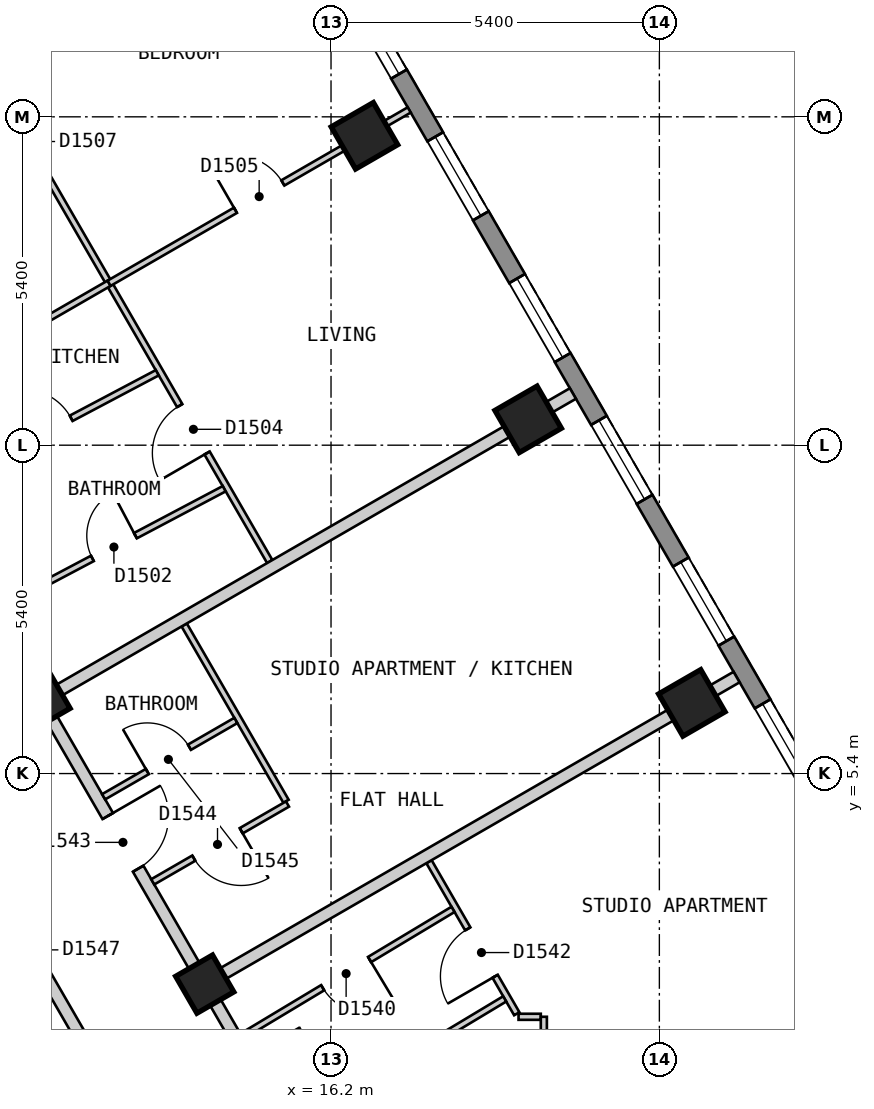
"""IFC4 building model, lengths in metres.
Left out: names, types, materials, properties, quantities, classifications, styles, units other than length and angle.
Written with IfcOpenShell. Run it as: python <this file> out.ifc"""

import sys

from ifc_helpers import new_model, si_unit, direction, frame, frame_2d, origin, origin_2d, place, context, subcontext, project, spatial, polyline, rectangle, outline, extrude, element, fill, save


model = new_model("IFC4")
c1 = context("Model", 3, precision=1e-05, world=origin(), true_north=direction((0.0, 1.0)))
c2 = subcontext(c1, "Body", "Model", "MODEL_VIEW")
j1 = project(units=[si_unit("LENGTHUNIT", "METRE"), si_unit("PLANEANGLEUNIT", "RADIAN")], contexts=[c1])
p1 = place(None, origin())
s1 = spatial("IfcSite", under=j1, at=p1, CompositionType="ELEMENT")
p2 = place(p1, origin())
s2 = spatial("IfcBuilding", under=s1, at=p2, CompositionType="ELEMENT")
p3 = place(p2, frame((0.0, 0.0, 184.2)))
s3 = spatial("IfcBuildingStorey", under=s2, at=p3, CompositionType="ELEMENT", Elevation=184.2)
for number, where, z_axis, x_axis in (
    (1, (22.134, 6.562, 0.0), (0.0, 0.0, 1.0), (-0.5, 0.866, 0.0)),
    (2, (19.442, 11.225, 0.0), (0.0, 0.0, 1.0), (-0.5, 0.866, 0.0)),
    (3, (16.75, 15.888, 0.0), (0.0, 0.0, 1.0), (-0.5, 0.866, 0.0)),
):
    element("IfcColumn", number, at=place(p3, frame(where, z_axis=z_axis, x_axis=x_axis)), inside=s3, PredefinedType="COLUMN", context=c2, shape_type="SweptSolid", body=[
        extrude(rectangle(XDim=0.8, YDim=0.8, at=origin_2d()), origin(), (0.0, 0.0, 1.0), 3.0),
    ])
for number, where, z_axis, x_axis in (
    (4, (14.123, 1.937, 0.0), (0.0, 0.0, 1.0), (-0.5, 0.866, 0.0)),
    (5, (11.431, 6.6, 0.0), (0.0, 0.0, 1.0), (-0.5, 0.866, 0.0)),
):
    element("IfcColumn", number, at=place(p3, frame(where, z_axis=z_axis, x_axis=x_axis)), inside=s3, PredefinedType="COLUMN", context=c2, shape_type="SweptSolid", body=[
        extrude(rectangle(XDim=0.7, YDim=0.7, at=origin_2d()), origin(), (0.0, 0.0, 1.0), 3.0),
    ])
p4 = place(p3, frame((26.024, 1.825, 0.0), z_axis=(0.0, 0.0, 1.0), x_axis=(-0.500010537973, 0.866019319597, 0.0)))
e6 = element("IfcWall", 6, at=p4, inside=s3, PredefinedType="SOLIDWALL", context=c2, shape_type="SweptSolid", body=[
    extrude(outline(polyline([(0.0, -0.15), (22.863, -0.15), (22.783, 0.15), (0.08, 0.15), (0.0, -0.15)])), origin(), (0.0, 0.0, 1.0), 2.7),
])
p5 = place(p4, frame((1.259, 0.0, 0.15)))
e7 = element("IfcOpeningElement", 7, at=p5, cuts=e6, PredefinedType="OPENING", context=c2, shape_type="SweptSolid", body=[
    extrude(rectangle(XDim=1.5, YDim=2.1, at=frame_2d((0.75, 1.05))), frame((0.0, 0.16, 0.0), z_axis=(0.0, -1.0, 0.0), x_axis=(1.0, 0.0, 0.0)), (0.0, 0.0, 1.0), 0.32),
])
p6 = place(p4, frame((3.952, 0.0, 0.15)))
e8 = element("IfcOpeningElement", 8, at=p6, cuts=e6, PredefinedType="OPENING", context=c2, shape_type="SweptSolid", body=[
    extrude(rectangle(XDim=1.5, YDim=2.1, at=frame_2d((0.75, 1.05))), frame((0.0, 0.16, 0.0), z_axis=(0.0, -1.0, 0.0), x_axis=(1.0, 0.0, 0.0)), (0.0, 0.0, 1.0), 0.32),
])
p7 = place(p4, frame((6.644, 0.0, 0.15)))
e9 = element("IfcOpeningElement", 9, at=p7, cuts=e6, PredefinedType="OPENING", context=c2, shape_type="SweptSolid", body=[
    extrude(rectangle(XDim=1.5, YDim=2.1, at=frame_2d((0.75, 1.05))), frame((0.0, 0.16, 0.0), z_axis=(0.0, -1.0, 0.0), x_axis=(1.0, 0.0, 0.0)), (0.0, 0.0, 1.0), 0.32),
])
p8 = place(p4, frame((9.335, 0.0, 0.15)))
e10 = element("IfcOpeningElement", 10, at=p8, cuts=e6, PredefinedType="OPENING", context=c2, shape_type="SweptSolid", body=[
    extrude(rectangle(XDim=1.5, YDim=2.1, at=frame_2d((0.75, 1.05))), frame((0.0, 0.16, 0.0), z_axis=(0.0, -1.0, 0.0), x_axis=(1.0, 0.0, 0.0)), (0.0, 0.0, 1.0), 0.32),
])
p9 = place(p4, frame((12.028, 0.0, 0.15)))
e11 = element("IfcOpeningElement", 11, at=p9, cuts=e6, PredefinedType="OPENING", context=c2, shape_type="SweptSolid", body=[
    extrude(rectangle(XDim=1.5, YDim=2.1, at=frame_2d((0.75, 1.05))), frame((0.0, 0.16, 0.0), z_axis=(0.0, -1.0, 0.0), x_axis=(1.0, 0.0, 0.0)), (0.0, 0.0, 1.0), 0.32),
])
p10 = place(p4, frame((14.72, 0.0, 0.15)))
e12 = element("IfcOpeningElement", 12, at=p10, cuts=e6, PredefinedType="OPENING", context=c2, shape_type="SweptSolid", body=[
    extrude(rectangle(XDim=1.5, YDim=2.1, at=frame_2d((0.75, 1.05))), frame((0.0, 0.16, 0.0), z_axis=(0.0, -1.0, 0.0), x_axis=(1.0, 0.0, 0.0)), (0.0, 0.0, 1.0), 0.32),
])
p11 = place(p4, frame((17.411, 0.0, 0.15)))
e13 = element("IfcOpeningElement", 13, at=p11, cuts=e6, PredefinedType="OPENING", context=c2, shape_type="SweptSolid", body=[
    extrude(rectangle(XDim=1.5, YDim=2.1, at=frame_2d((0.75, 1.05))), frame((0.0, 0.16, 0.0), z_axis=(0.0, -1.0, 0.0), x_axis=(1.0, 0.0, 0.0)), (0.0, 0.0, 1.0), 0.32),
])
p12 = place(p4, frame((20.104, 0.0, 0.15)))
e14 = element("IfcOpeningElement", 14, at=p12, cuts=e6, PredefinedType="OPENING", context=c2, shape_type="SweptSolid", body=[
    extrude(rectangle(XDim=1.5, YDim=2.1, at=frame_2d((0.75, 1.05))), frame((0.0, 0.16, 0.0), z_axis=(0.0, -1.0, 0.0), x_axis=(1.0, 0.0, 0.0)), (0.0, 0.0, 1.0), 0.32),
])
p13 = place(p3, frame((9.469, 5.6, 0.0), z_axis=(0.0, 0.0, 1.0), x_axis=(0.499964524401, -0.866045884662, 0.0)))
e15 = element("IfcWall", 15, at=p13, inside=s3, PredefinedType="PARTITIONING", context=c2, shape_type="SweptSolid", body=[
    extrude(rectangle(XDim=7.042, YDim=0.2, at=frame_2d((3.521, 0.0))), origin(), (0.0, 0.0, 1.0), 2.7),
])
p14 = place(p13, frame((3.129, 0.0, 0.0)))
e16 = element("IfcOpeningElement", 16, at=p14, cuts=e15, PredefinedType="OPENING", context=c2, shape_type="SweptSolid", body=[
    extrude(rectangle(XDim=0.9, YDim=2.1, at=frame_2d((0.45, 1.05))), frame((0.0, 0.11, 0.0), z_axis=(0.0, -1.0, 0.0), x_axis=(1.0, 0.0, 0.0)), (0.0, 0.0, 1.0), 0.22),
])
p15 = place(p3, frame((10.739, 7.8, 0.0), z_axis=(0.0, 0.0, 1.0), x_axis=(0.500023726918, -0.866011704609, 0.0)))
e17 = element("IfcWall", 17, at=p15, inside=s3, PredefinedType="PARTITIONING", context=c2, shape_type="SweptSolid", body=[
    extrude(rectangle(XDim=9.47, YDim=0.2, at=frame_2d((4.735, 0.0))), origin(), (0.0, 0.0, 1.0), 2.7),
])
p16 = place(p15, frame((8.168, 0.0, 0.0)))
e18 = element("IfcOpeningElement", 18, at=p16, cuts=e17, PredefinedType="OPENING", context=c2, shape_type="SweptSolid", body=[
    extrude(rectangle(XDim=1.0, YDim=2.1, at=frame_2d((0.5, 1.05))), frame((0.0, 0.11, 0.0), z_axis=(0.0, -1.0, 0.0), x_axis=(1.0, 0.0, 0.0)), (0.0, 0.0, 1.0), 0.22),
])
p17 = place(p15, frame((3.578, 0.0, 0.0)))
e19 = element("IfcOpeningElement", 19, at=p17, cuts=e17, PredefinedType="OPENING", context=c2, shape_type="SweptSolid", body=[
    extrude(rectangle(XDim=1.0, YDim=2.1, at=frame_2d((0.5, 1.05))), frame((0.0, 0.11, 0.0), z_axis=(0.0, -1.0, 0.0), x_axis=(1.0, 0.0, 0.0)), (0.0, 0.0, 1.0), 0.22),
])
p18 = place(p3, frame((13.785, 7.844, 0.0), z_axis=(0.0, 0.0, 1.0), x_axis=(0.500176784828, -0.865923312955, 0.0)))
e20 = element("IfcWall", 20, at=p18, inside=s3, PredefinedType="PARTITIONING", context=c2, shape_type="SweptSolid", body=[
    extrude(rectangle(XDim=3.349, YDim=0.1, at=frame_2d((1.674, 0.0))), origin(), (0.0, 0.0, 1.0), 2.7),
])
p19 = place(p3, frame((17.811, 3.951, 0.0), z_axis=(0.0, 0.0, 1.0), x_axis=(0.499976149225, -0.866039173598, 0.0)))
e21 = element("IfcWall", 21, at=p19, inside=s3, PredefinedType="PARTITIONING", context=c2, shape_type="SweptSolid", body=[
    extrude(rectangle(XDim=2.888, YDim=0.1, at=frame_2d((1.444, 0.0))), origin(), (0.0, 0.0, 1.0), 2.7),
])
p20 = place(p19, frame((1.276, 0.0, 0.0)))
e22 = element("IfcOpeningElement", 22, at=p20, cuts=e21, PredefinedType="OPENING", context=c2, shape_type="SweptSolid", body=[
    extrude(rectangle(XDim=0.9, YDim=2.1, at=frame_2d((0.45, 1.05))), frame((0.0, 0.06, 0.0), z_axis=(0.0, -1.0, 0.0), x_axis=(1.0, 0.0, 0.0)), (0.0, 0.0, 1.0), 0.12),
])
p21 = place(p3, frame((9.883, 18.082, 0.0), z_axis=(0.0, 0.0, 1.0), x_axis=(0.500004428835, -0.86602284678, 0.0)))
e23 = element("IfcWall", 23, at=p21, inside=s3, PredefinedType="PARTITIONING", context=c2, shape_type="SweptSolid", body=[
    extrude(rectangle(XDim=10.618, YDim=0.1, at=frame_2d((5.309, 0.0))), origin(), (0.0, 0.0, 1.0), 2.7),
])
p22 = place(p21, frame((7.657, 0.0, 0.0)))
e24 = element("IfcOpeningElement", 24, at=p22, cuts=e23, PredefinedType="OPENING", context=c2, shape_type="SweptSolid", body=[
    extrude(rectangle(XDim=0.9, YDim=2.1, at=frame_2d((0.45, 1.05))), frame((0.0, 0.06, 0.0), z_axis=(0.0, -1.0, 0.0), x_axis=(1.0, 0.0, 0.0)), (0.0, 0.0, 1.0), 0.12),
])
p23 = place(p21, frame((2.242, 0.0, 0.0)))
e25 = element("IfcOpeningElement", 25, at=p23, cuts=e23, PredefinedType="OPENING", context=c2, shape_type="SweptSolid", body=[
    extrude(rectangle(XDim=0.8, YDim=2.1, at=frame_2d((0.4, 1.05))), frame((0.0, 0.06, 0.0), z_axis=(0.0, -1.0, 0.0), x_axis=(1.0, 0.0, 0.0)), (0.0, 0.0, 1.0), 0.12),
])
p24 = place(p3, frame((19.284, 1.4, 0.0), z_axis=(0.0, 0.0, 1.0), x_axis=(1.0, 0.0, 0.0)))
e26 = element("IfcWall", 26, at=p24, inside=s3, PredefinedType="PARTITIONING", context=c2, shape_type="SweptSolid", body=[
    extrude(rectangle(XDim=0.366, YDim=0.1, at=frame_2d((0.183, 0.0))), origin(), (0.0, 0.0, 1.0), 2.7),
])
p25 = place(p3, frame((19.7, 0.679, 0.0), z_axis=(0.0, 0.0, 1.0), x_axis=(0.0, 1.0, 0.0)))
e27 = element("IfcWall", 27, at=p25, inside=s3, PredefinedType="PARTITIONING", context=c2, shape_type="SweptSolid", body=[
    extrude(rectangle(XDim=0.721, YDim=0.1, at=frame_2d((0.36, 0.0))), origin(), (0.0, 0.0, 1.0), 2.7),
])
p26 = place(p3, frame((9.76, 10.096, 0.0), z_axis=(0.0, 0.0, 1.0), x_axis=(0.883925629136, 0.467627503636, 0.0)))
e28 = element("IfcWall", 28, at=p26, inside=s3, PredefinedType="PARTITIONING", context=c2, shape_type="SweptSolid", body=[
    extrude(rectangle(XDim=4.052, YDim=0.1, at=frame_2d((2.026, 0.0))), origin(), (0.0, 0.0, 1.0), 2.7),
])
p27 = place(p26, frame((1.551, 0.0, 0.0)))
e29 = element("IfcOpeningElement", 29, at=p27, cuts=e28, PredefinedType="OPENING", context=c2, shape_type="SweptSolid", body=[
    extrude(rectangle(XDim=0.9, YDim=2.1, at=frame_2d((0.45, 1.05))), frame((0.0, 0.06, 0.0), z_axis=(0.0, -1.0, 0.0), x_axis=(1.0, 0.0, 0.0)), (0.0, 0.0, 1.0), 0.12),
])
p28 = place(p3, frame((10.772, 8.143, 0.0), z_axis=(0.0, 0.0, 1.0), x_axis=(0.884049480227, 0.467393320995, 0.0)))
e30 = element("IfcWall", 30, at=p28, inside=s3, PredefinedType="PARTITIONING", context=c2, shape_type="SweptSolid", body=[
    extrude(rectangle(XDim=4.153, YDim=0.1, at=frame_2d((2.076, 0.0))), origin(), (0.0, 0.0, 1.0), 2.7),
])
p29 = place(p28, frame((1.701, 0.0, 0.0)))
e31 = element("IfcOpeningElement", 31, at=p29, cuts=e30, PredefinedType="OPENING", context=c2, shape_type="SweptSolid", body=[
    extrude(rectangle(XDim=0.8, YDim=2.1, at=frame_2d((0.4, 1.05))), frame((0.0, 0.06, 0.0), z_axis=(0.0, -1.0, 0.0), x_axis=(1.0, 0.0, 0.0)), (0.0, 0.0, 1.0), 0.12),
])
p30 = place(p3, frame((13.268, 3.619, 0.0), z_axis=(0.0, 0.0, 1.0), x_axis=(0.865902724456, 0.500212426655, 0.0)))
e32 = element("IfcWall", 32, at=p30, inside=s3, PredefinedType="PARTITIONING", context=c2, shape_type="SweptSolid", body=[
    extrude(rectangle(XDim=2.559, YDim=0.1, at=frame_2d((1.28, 0.0))), origin(), (0.0, 0.0, 1.0), 2.7),
])
p31 = place(p30, frame((0.78, 0.0, 0.0)))
e33 = element("IfcOpeningElement", 33, at=p31, cuts=e32, PredefinedType="OPENING", context=c2, shape_type="SweptSolid", body=[
    extrude(rectangle(XDim=0.9, YDim=2.1, at=frame_2d((0.45, 1.05))), frame((0.0, 0.06, 0.0), z_axis=(0.0, -1.0, 0.0), x_axis=(1.0, 0.0, 0.0)), (0.0, 0.0, 1.0), 0.12),
])
p32 = place(p3, frame((12.46, 5.018, 0.0), z_axis=(0.0, 0.0, 1.0), x_axis=(0.866080321209, 0.499904868165, 0.0)))
e34 = element("IfcWall", 34, at=p32, inside=s3, PredefinedType="PARTITIONING", context=c2, shape_type="SweptSolid", body=[
    extrude(rectangle(XDim=2.51, YDim=0.1, at=frame_2d((1.255, 0.0))), origin(), (0.0, 0.0, 1.0), 2.7),
])
p33 = place(p32, frame((0.83, 0.0, 0.0)))
e35 = element("IfcOpeningElement", 35, at=p33, cuts=e34, PredefinedType="OPENING", context=c2, shape_type="SweptSolid", body=[
    extrude(rectangle(XDim=0.8, YDim=2.1, at=frame_2d((0.4, 1.05))), frame((0.0, 0.06, 0.0), z_axis=(0.0, -1.0, 0.0), x_axis=(1.0, 0.0, 0.0)), (0.0, 0.0, 1.0), 0.12),
])
p34 = place(p3, frame((8.999, 11.413, 0.0), z_axis=(0.0, 0.0, 1.0), x_axis=(0.86606561423, 0.499930346997, 0.0)))
e36 = element("IfcWall", 36, at=p34, inside=s3, PredefinedType="PARTITIONING", context=c2, shape_type="SweptSolid", body=[
    extrude(rectangle(XDim=4.1, YDim=0.1, at=frame_2d((2.05, 0.0))), origin(), (0.0, 0.0, 1.0), 2.7),
])
p35 = place(p3, frame((14.734, 1.08, 0.0), z_axis=(0.0, 0.0, 1.0), x_axis=(0.857205608004, 0.514974315482, 0.0)))
e37 = element("IfcWall", 37, at=p35, inside=s3, PredefinedType="PARTITIONING", context=c2, shape_type="SweptSolid", body=[
    extrude(rectangle(XDim=4.051, YDim=0.1, at=frame_2d((2.025, 0.0))), origin(), (0.0, 0.0, 1.0), 2.7),
])
p36 = place(p35, frame((1.55, 0.0, 0.0)))
e38 = element("IfcOpeningElement", 38, at=p36, cuts=e37, PredefinedType="OPENING", context=c2, shape_type="SweptSolid", body=[
    extrude(rectangle(XDim=0.9, YDim=2.1, at=frame_2d((0.45, 1.05))), frame((0.0, 0.06, 0.0), z_axis=(0.0, -1.0, 0.0), x_axis=(1.0, 0.0, 0.0)), (0.0, 0.0, 1.0), 0.12),
])
p37 = place(p3, frame((15.499, -0.444, 0.0), z_axis=(0.0, 0.0, 1.0), x_axis=(0.857061798163, 0.515213619899, 0.0)))
e39 = element("IfcWall", 39, at=p37, inside=s3, PredefinedType="PARTITIONING", context=c2, shape_type="SweptSolid", body=[
    extrude(rectangle(XDim=4.15, YDim=0.1, at=frame_2d((2.075, 0.0))), origin(), (0.0, 0.0, 1.0), 2.7),
])
p38 = place(p37, frame((1.7, 0.0, 0.0)))
e40 = element("IfcOpeningElement", 40, at=p38, cuts=e39, PredefinedType="OPENING", context=c2, shape_type="SweptSolid", body=[
    extrude(rectangle(XDim=0.8, YDim=2.1, at=frame_2d((0.4, 1.05))), frame((0.0, 0.06, 0.0), z_axis=(0.0, -1.0, 0.0), x_axis=(1.0, 0.0, 0.0)), (0.0, 0.0, 1.0), 0.12),
])
p39 = place(p3, frame((14.21, 1.987, 0.0), z_axis=(0.0, 0.0, 1.0), x_axis=(0.866022959057, 0.500004234368, 0.0)))
e41 = element("IfcWall", 41, at=p39, inside=s3, PredefinedType="PARTITIONING", context=c2, shape_type="SweptSolid", body=[
    extrude(rectangle(XDim=10.0, YDim=0.2, at=frame_2d((5.0, 0.0))), origin(), (0.0, 0.0, 1.0), 2.7),
])
p40 = place(p3, frame((11.518, 6.65, 0.0), z_axis=(0.0, 0.0, 1.0), x_axis=(0.866016855193, 0.500014806302, 0.0)))
e42 = element("IfcWall", 42, at=p40, inside=s3, PredefinedType="PARTITIONING", context=c2, shape_type="SweptSolid", body=[
    extrude(rectangle(XDim=10.0, YDim=0.2, at=frame_2d((5.0, 0.0))), origin(), (0.0, 0.0, 1.0), 2.7),
])
p41 = place(p3, frame((12.55, 13.463, 0.0), z_axis=(0.0, 0.0, 1.0), x_axis=(0.866004402611, 0.500036373335, 0.0)))
e43 = element("IfcWall", 43, at=p41, inside=s3, PredefinedType="PARTITIONING", context=c2, shape_type="SweptSolid", body=[
    extrude(rectangle(XDim=5.7, YDim=0.1, at=frame_2d((2.85, 0.0))), origin(), (0.0, 0.0, 1.0), 2.7),
])
p42 = place(p41, frame((2.4, 0.0, 0.0)))
e44 = element("IfcOpeningElement", 44, at=p42, cuts=e43, PredefinedType="OPENING", context=c2, shape_type="SweptSolid", body=[
    extrude(rectangle(XDim=0.9, YDim=2.1, at=frame_2d((0.45, 1.05))), frame((0.0, 0.06, 0.0), z_axis=(0.0, -1.0, 0.0), x_axis=(1.0, 0.0, 0.0)), (0.0, 0.0, 1.0), 0.12),
])
p43 = place(p6, origin())
e45 = element("IfcWindow", 45, at=p43, inside=s3, PartitioningType="SINGLE_PANEL", PredefinedType="WINDOW", context=c2, shape_type="SweptSolid", body=[
    extrude(rectangle(XDim=1.5, YDim=2.1, at=frame_2d((0.75, 1.05))), frame((0.0, 0.03, 0.0), z_axis=(0.0, -1.0, 0.0), x_axis=(1.0, 0.0, 0.0)), (0.0, 0.0, 1.0), 0.06),
])
fill(e8, e45)
p44 = place(p7, origin())
e46 = element("IfcWindow", 46, at=p44, inside=s3, PartitioningType="SINGLE_PANEL", PredefinedType="WINDOW", context=c2, shape_type="SweptSolid", body=[
    extrude(rectangle(XDim=1.5, YDim=2.1, at=frame_2d((0.75, 1.05))), frame((0.0, 0.03, 0.0), z_axis=(0.0, -1.0, 0.0), x_axis=(1.0, 0.0, 0.0)), (0.0, 0.0, 1.0), 0.06),
])
fill(e9, e46)
p45 = place(p8, origin())
e47 = element("IfcWindow", 47, at=p45, inside=s3, PartitioningType="SINGLE_PANEL", PredefinedType="WINDOW", context=c2, shape_type="SweptSolid", body=[
    extrude(rectangle(XDim=1.5, YDim=2.1, at=frame_2d((0.75, 1.05))), frame((0.0, 0.03, 0.0), z_axis=(0.0, -1.0, 0.0), x_axis=(1.0, 0.0, 0.0)), (0.0, 0.0, 1.0), 0.06),
])
fill(e10, e47)
p46 = place(p9, origin())
e48 = element("IfcWindow", 48, at=p46, inside=s3, PartitioningType="SINGLE_PANEL", PredefinedType="WINDOW", context=c2, shape_type="SweptSolid", body=[
    extrude(rectangle(XDim=1.5, YDim=2.1, at=frame_2d((0.75, 1.05))), frame((0.0, 0.03, 0.0), z_axis=(0.0, -1.0, 0.0), x_axis=(1.0, 0.0, 0.0)), (0.0, 0.0, 1.0), 0.06),
])
fill(e11, e48)
p47 = place(p10, origin())
e49 = element("IfcWindow", 49, at=p47, inside=s3, PartitioningType="SINGLE_PANEL", PredefinedType="WINDOW", context=c2, shape_type="SweptSolid", body=[
    extrude(rectangle(XDim=1.5, YDim=2.1, at=frame_2d((0.75, 1.05))), frame((0.0, 0.03, 0.0), z_axis=(0.0, -1.0, 0.0), x_axis=(1.0, 0.0, 0.0)), (0.0, 0.0, 1.0), 0.06),
])
fill(e12, e49)
p48 = place(p11, origin())
e50 = element("IfcWindow", 50, at=p48, inside=s3, PartitioningType="SINGLE_PANEL", PredefinedType="WINDOW", context=c2, shape_type="SweptSolid", body=[
    extrude(rectangle(XDim=1.5, YDim=2.1, at=frame_2d((0.75, 1.05))), frame((0.0, 0.03, 0.0), z_axis=(0.0, -1.0, 0.0), x_axis=(1.0, 0.0, 0.0)), (0.0, 0.0, 1.0), 0.06),
])
fill(e13, e50)
p49 = place(p29, origin())
e51 = element("IfcDoor", 51, at=p49, inside=s3, OperationType="SINGLE_SWING_RIGHT", PredefinedType="DOOR", context=c2, shape_type="SweptSolid", body=[
    extrude(rectangle(XDim=0.8, YDim=2.1, at=frame_2d((0.4, 1.05))), frame((0.0, 0.025, 0.0), z_axis=(0.0, -1.0, 0.0), x_axis=(1.0, 0.0, 0.0)), (0.0, 0.0, 1.0), 0.05),
])
fill(e31, e51)
p50 = place(p27, origin())
e52 = element("IfcDoor", 52, at=p50, inside=s3, OperationType="SINGLE_SWING_LEFT", PredefinedType="DOOR", context=c2, shape_type="SweptSolid", body=[
    extrude(rectangle(XDim=0.9, YDim=2.1, at=frame_2d((0.45, 1.05))), frame((0.0, 0.025, 0.0), z_axis=(0.0, -1.0, 0.0), x_axis=(1.0, 0.0, 0.0)), (0.0, 0.0, 1.0), 0.05),
])
fill(e29, e52)
p51 = place(p22, origin())
e53 = element("IfcDoor", 53, at=p51, inside=s3, OperationType="SINGLE_SWING_RIGHT", PredefinedType="DOOR", context=c2, shape_type="SweptSolid", body=[
    extrude(rectangle(XDim=0.9, YDim=2.1, at=frame_2d((0.45, 1.05))), frame((0.0, 0.025, 0.0), z_axis=(0.0, -1.0, 0.0), x_axis=(1.0, 0.0, 0.0)), (0.0, 0.0, 1.0), 0.05),
])
fill(e24, e53)
p52 = place(p42, origin())
e54 = element("IfcDoor", 54, at=p52, inside=s3, OperationType="SINGLE_SWING_LEFT", PredefinedType="DOOR", context=c2, shape_type="SweptSolid", body=[
    extrude(rectangle(XDim=0.9, YDim=2.1, at=frame_2d((0.45, 1.05))), frame((0.0, 0.025, 0.0), z_axis=(0.0, -1.0, 0.0), x_axis=(1.0, 0.0, 0.0)), (0.0, 0.0, 1.0), 0.05),
])
fill(e44, e54)
p53 = place(p36, origin())
e55 = element("IfcDoor", 55, at=p53, inside=s3, OperationType="SINGLE_SWING_RIGHT", PredefinedType="DOOR", context=c2, shape_type="SweptSolid", body=[
    extrude(rectangle(XDim=0.9, YDim=2.1, at=frame_2d((0.45, 1.05))), frame((0.0, 0.025, 0.0), z_axis=(0.0, -1.0, 0.0), x_axis=(1.0, 0.0, 0.0)), (0.0, 0.0, 1.0), 0.05),
])
fill(e38, e55)
p54 = place(p20, origin())
e56 = element("IfcDoor", 56, at=p54, inside=s3, OperationType="SINGLE_SWING_RIGHT", PredefinedType="DOOR", context=c2, shape_type="SweptSolid", body=[
    extrude(rectangle(XDim=0.9, YDim=2.1, at=frame_2d((0.45, 1.05))), frame((0.0, 0.025, 0.0), z_axis=(0.0, -1.0, 0.0), x_axis=(1.0, 0.0, 0.0)), (0.0, 0.0, 1.0), 0.05),
])
fill(e22, e56)
p55 = place(p17, origin())
e57 = element("IfcDoor", 57, at=p55, inside=s3, OperationType="SINGLE_SWING_LEFT", PredefinedType="DOOR", context=c2, shape_type="SweptSolid", body=[
    extrude(rectangle(XDim=1.0, YDim=2.1, at=frame_2d((0.5, 1.05))), frame((0.0, 0.025, 0.0), z_axis=(0.0, -1.0, 0.0), x_axis=(1.0, 0.0, 0.0)), (0.0, 0.0, 1.0), 0.05),
])
fill(e19, e57)
p56 = place(p31, origin())
e58 = element("IfcDoor", 58, at=p56, inside=s3, OperationType="SINGLE_SWING_RIGHT", PredefinedType="DOOR", context=c2, shape_type="SweptSolid", body=[
    extrude(rectangle(XDim=0.9, YDim=2.1, at=frame_2d((0.45, 1.05))), frame((0.0, 0.025, 0.0), z_axis=(0.0, -1.0, 0.0), x_axis=(1.0, 0.0, 0.0)), (0.0, 0.0, 1.0), 0.05),
])
fill(e33, e58)
p57 = place(p33, origin())
e59 = element("IfcDoor", 59, at=p57, inside=s3, OperationType="SINGLE_SWING_LEFT", PredefinedType="DOOR", context=c2, shape_type="SweptSolid", body=[
    extrude(rectangle(XDim=0.8, YDim=2.1, at=frame_2d((0.4, 1.05))), frame((0.0, 0.025, 0.0), z_axis=(0.0, -1.0, 0.0), x_axis=(1.0, 0.0, 0.0)), (0.0, 0.0, 1.0), 0.05),
])
fill(e35, e59)
save(model, sys.argv[1])
